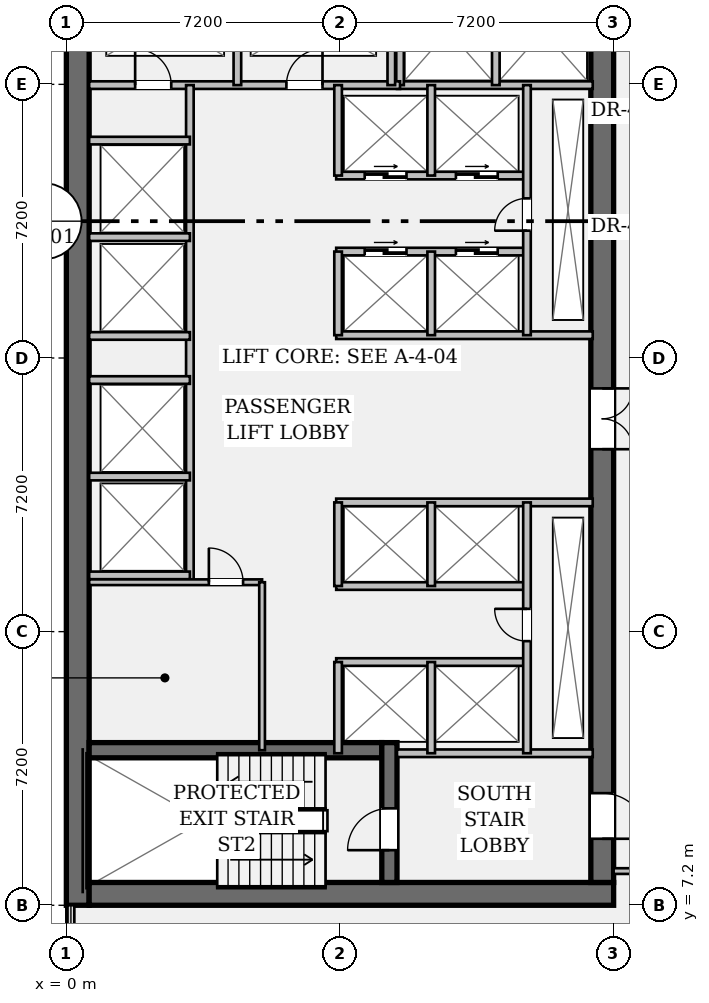
"""IFC4 building model, lengths in metres.
Left out: names, types, materials, properties, quantities, classifications, styles, units other than length and angle.
Written with IfcOpenShell. Run it as: python <this file> out.ifc"""

import sys

from ifc_helpers import new_model, si_unit, direction, frame, frame_2d, origin, place, context, subcontext, project, spatial, rectangle, extrude, element, fill, save


model = new_model("IFC4")
c1 = context("Model", 3, precision=1e-05, world=origin(), true_north=direction((0.0, 1.0)))
c2 = subcontext(c1, "Body", "Model", "MODEL_VIEW")
j1 = project(units=[si_unit("LENGTHUNIT", "METRE"), si_unit("PLANEANGLEUNIT", "RADIAN")], contexts=[c1])
p1 = place(None, origin())
s1 = spatial("IfcSite", under=j1, at=p1, CompositionType="ELEMENT")
p2 = place(p1, origin())
s2 = spatial("IfcBuilding", under=s1, at=p2, CompositionType="ELEMENT")
p3 = place(p2, frame((0.0, 0.0, 54.25)))
s3 = spatial("IfcBuildingStorey", under=s2, at=p3, CompositionType="ELEMENT", Elevation=54.25)
p4 = place(p3, frame((0.3, 7.2, 0.0), z_axis=(0.0, 0.0, 1.0), x_axis=(0.0, 1.0, 0.0)))
e1 = element("IfcWall", 1, at=p4, inside=s3, PredefinedType="SHEAR", context=c2, shape_type="SweptSolid", body=[
    extrude(rectangle(XDim=28.8, YDim=0.6, at=frame_2d((14.4, 0.0))), origin(), (0.0, 0.0, 1.0), 3.57),
])
p5 = place(p3, frame((0.6, 7.5, 0.0), z_axis=(0.0, 0.0, 1.0), x_axis=(1.0, 0.0, 0.0)))
e2 = element("IfcWall", 2, at=p5, inside=s3, PredefinedType="SHEAR", context=c2, shape_type="SweptSolid", body=[
    extrude(rectangle(XDim=13.8, YDim=0.6, at=frame_2d((6.9, 0.0))), origin(), (0.0, 0.0, 1.0), 3.57),
])
p6 = place(p3, frame((14.1, 35.4, 0.0), z_axis=(0.0, 0.0, 1.0), x_axis=(0.0, -1.0, 0.0)))
e3 = element("IfcWall", 3, at=p6, inside=s3, PredefinedType="SHEAR", context=c2, shape_type="SweptSolid", body=[
    extrude(rectangle(XDim=27.6, YDim=0.6, at=frame_2d((13.8, 0.0))), origin(), (0.0, 0.0, 1.0), 3.57),
])
p7 = place(p6, frame((1.3, 0.0, 0.0)))
e4 = element("IfcOpeningElement", 4, at=p7, cuts=e3, PredefinedType="OPENING", context=c2, shape_type="SweptSolid", body=[
    extrude(rectangle(XDim=1.2, YDim=2.15, at=frame_2d((0.6, 1.075))), frame((0.0, 0.312, 0.0), z_axis=(0.0, -1.0, 0.0), x_axis=(1.0, 0.0, 0.0)), (0.0, 0.0, 1.0), 0.624),
])
p8 = place(p6, frame((25.25, 0.0, 0.0)))
e5 = element("IfcOpeningElement", 5, at=p8, cuts=e3, PredefinedType="OPENING", context=c2, shape_type="SweptSolid", body=[
    extrude(rectangle(XDim=1.2, YDim=2.15, at=frame_2d((0.6, 1.075))), frame((0.0, 0.312, 0.0), z_axis=(0.0, -1.0, 0.0), x_axis=(1.0, 0.0, 0.0)), (0.0, 0.0, 1.0), 0.624),
])
p9 = place(p6, frame((14.6, 0.0, 0.0)))
e6 = element("IfcOpeningElement", 6, at=p9, cuts=e3, PredefinedType="OPENING", context=c2, shape_type="SweptSolid", body=[
    extrude(rectangle(XDim=1.6, YDim=2.2, at=frame_2d((0.8, 1.1))), frame((0.0, 0.312, 0.0), z_axis=(0.0, -1.0, 0.0), x_axis=(1.0, 0.0, 0.0)), (0.0, 0.0, 1.0), 0.624),
])
p10 = place(p3, frame((0.6, 11.28, 0.0), z_axis=(0.0, 0.0, 1.0), x_axis=(1.0, 0.0, 0.0)))
e7 = element("IfcWall", 7, at=p10, inside=s3, PredefinedType="SHEAR", context=c2, shape_type="SweptSolid", body=[
    extrude(rectangle(XDim=7.7, YDim=0.4, at=frame_2d((3.85, 0.0))), origin(), (0.0, 0.0, 1.0), 3.57),
])
p11 = place(p3, frame((8.5, 7.8, 0.0), z_axis=(0.0, 0.0, 1.0), x_axis=(0.0, 1.0, 0.0)))
e8 = element("IfcWall", 8, at=p11, inside=s3, PredefinedType="SHEAR", context=c2, shape_type="SweptSolid", body=[
    extrude(rectangle(XDim=3.68, YDim=0.4, at=frame_2d((1.84, 0.0))), origin(), (0.0, 0.0, 1.0), 3.57),
])
p12 = place(p11, frame((0.85, 0.0, 0.0)))
e9 = element("IfcOpeningElement", 9, at=p12, cuts=e8, PredefinedType="OPENING", context=c2, shape_type="SweptSolid", body=[
    extrude(rectangle(XDim=1.1, YDim=2.15, at=frame_2d((0.55, 1.075))), frame((0.0, 0.212, 0.0), z_axis=(0.0, -1.0, 0.0), x_axis=(1.0, 0.0, 0.0)), (0.0, 0.0, 1.0), 0.424),
])
for number, where, z_axis, x_axis in (
    (10, (8.7, 11.2, 0.0), (0.0, 0.0, 1.0), (1.0, 0.0, 0.0)),
    (11, (8.7, 28.78, 0.0), (0.0, 0.0, 1.0), (1.0, 0.0, 0.0)),
):
    element("IfcWall", number, at=place(p3, frame(where, z_axis=z_axis, x_axis=x_axis)), inside=s3, PredefinedType="PARTITIONING", context=c2, shape_type="SweptSolid", body=[
        extrude(rectangle(XDim=5.15, YDim=0.2, at=frame_2d((2.575, 0.0))), origin(), (0.0, 0.0, 1.0), 3.57),
    ])
for number, where, z_axis, x_axis in (
    (12, (8.78, 28.78, 0.0), (0.0, 0.0, 1.0), (0.0, 1.0, 0.0)),
    (13, (11.3, 28.78, 0.0), (0.0, 0.0, 1.0), (0.0, 1.0, 0.0)),
):
    element("IfcWall", number, at=place(p3, frame(where, z_axis=z_axis, x_axis=x_axis)), inside=s3, PredefinedType="PARTITIONING", context=c2, shape_type="SweptSolid", body=[
        extrude(rectangle(XDim=3.1, YDim=0.2, at=frame_2d((1.55, 0.0))), origin(), (0.0, 0.0, 1.0), 3.57),
    ])
p13 = place(p3, frame((0.6, 28.78, 0.0), z_axis=(0.0, 0.0, 1.0), x_axis=(1.0, 0.0, 0.0)))
e14 = element("IfcWall", 14, at=p13, inside=s3, PredefinedType="PARTITIONING", context=c2, shape_type="SweptSolid", body=[
    extrude(rectangle(XDim=8.18, YDim=0.2, at=frame_2d((4.09, 0.0))), origin(), (0.0, 0.0, 1.0), 3.57),
])
p14 = place(p13, frame((1.21, 0.0, 0.0)))
e15 = element("IfcOpeningElement", 15, at=p14, cuts=e14, PredefinedType="OPENING", context=c2, shape_type="SweptSolid", body=[
    extrude(rectangle(XDim=0.95, YDim=2.15, at=frame_2d((0.475, 1.075))), frame((0.0, 0.112, 0.0), z_axis=(0.0, -1.0, 0.0), x_axis=(1.0, 0.0, 0.0)), (0.0, 0.0, 1.0), 0.224),
])
p15 = place(p13, frame((5.19, 0.0, 0.0)))
e16 = element("IfcOpeningElement", 16, at=p15, cuts=e14, PredefinedType="OPENING", context=c2, shape_type="SweptSolid", body=[
    extrude(rectangle(XDim=0.95, YDim=2.15, at=frame_2d((0.475, 1.075))), frame((0.0, 0.112, 0.0), z_axis=(0.0, -1.0, 0.0), x_axis=(1.0, 0.0, 0.0)), (0.0, 0.0, 1.0), 0.224),
])
for number, where, z_axis, x_axis in (
    (17, (4.5, 28.78, 0.0), (0.0, 0.0, 1.0), (0.0, 1.0, 0.0)),
    (18, (8.55, 28.78, 0.0), (0.0, 0.0, 1.0), (0.0, 1.0, 0.0)),
):
    element("IfcWall", number, at=place(p3, frame(where, z_axis=z_axis, x_axis=x_axis)), inside=s3, PredefinedType="PARTITIONING", context=c2, shape_type="SweptSolid", body=[
        extrude(rectangle(XDim=2.94, YDim=0.2, at=frame_2d((1.47, 0.0))), origin(), (0.0, 0.0, 1.0), 3.57),
    ])
p16 = place(p3, frame((3.25, 15.7, 0.0), z_axis=(0.0, 0.0, 1.0), x_axis=(0.0, 1.0, 0.0)))
e19 = element("IfcWall", 19, at=p16, inside=s3, PredefinedType="PARTITIONING", context=c2, shape_type="SweptSolid", body=[
    extrude(rectangle(XDim=13.08, YDim=0.2, at=frame_2d((6.54, 0.0))), origin(), (0.0, 0.0, 1.0), 3.57),
])
for number, where, z_axis, x_axis in (
    (20, (0.6, 15.88, 0.0), (0.0, 0.0, 1.0), (1.0, 0.0, 0.0)),
    (21, (0.6, 18.48, 0.0), (0.0, 0.0, 1.0), (1.0, 0.0, 0.0)),
    (22, (0.6, 22.18, 0.0), (0.0, 0.0, 1.0), (1.0, 0.0, 0.0)),
    (23, (0.6, 24.78, 0.0), (0.0, 0.0, 1.0), (1.0, 0.0, 0.0)),
    (24, (0.6, 21.02, 0.0), (0.0, 0.0, 1.0), (1.0, 0.0, 0.0)),
    (25, (0.6, 27.32, 0.0), (0.0, 0.0, 1.0), (1.0, 0.0, 0.0)),
):
    element("IfcWall", number, at=place(p3, frame(where, z_axis=z_axis, x_axis=x_axis)), inside=s3, PredefinedType="PARTITIONING", context=c2, shape_type="SweptSolid", body=[
        extrude(rectangle(XDim=2.65, YDim=0.2, at=frame_2d((1.325, 0.0))), origin(), (0.0, 0.0, 1.0), 3.57),
    ])
p17 = place(p3, frame((7.1, 22.2, 0.0), z_axis=(0.0, 0.0, 1.0), x_axis=(1.0, 0.0, 0.0)))
e26 = element("IfcWall", 26, at=p17, inside=s3, PredefinedType="PARTITIONING", context=c2, shape_type="SweptSolid", body=[
    extrude(rectangle(XDim=6.75, YDim=0.2, at=frame_2d((3.375, 0.0))), origin(), (0.0, 0.0, 1.0), 3.57),
])
p18 = place(p3, frame((7.1, 24.4, 0.0), z_axis=(0.0, 0.0, 1.0), x_axis=(1.0, 0.0, 0.0)))
e27 = element("IfcWall", 27, at=p18, inside=s3, PredefinedType="PARTITIONING", context=c2, shape_type="SweptSolid", body=[
    extrude(rectangle(XDim=5.02, YDim=0.2, at=frame_2d((2.51, 0.0))), origin(), (0.0, 0.0, 1.0), 3.57),
])
p19 = place(p18, frame((0.75, 0.0, 0.0)))
e28 = element("IfcOpeningElement", 28, at=p19, cuts=e27, PredefinedType="OPENING", context=c2, shape_type="SweptSolid", body=[
    extrude(rectangle(XDim=1.1, YDim=2.2, at=frame_2d((0.55, 1.1))), frame((0.0, 0.112, 0.0), z_axis=(0.0, -1.0, 0.0), x_axis=(1.0, 0.0, 0.0)), (0.0, 0.0, 1.0), 0.224),
])
p20 = place(p18, frame((3.15, 0.0, 0.0)))
e29 = element("IfcOpeningElement", 29, at=p20, cuts=e27, PredefinedType="OPENING", context=c2, shape_type="SweptSolid", body=[
    extrude(rectangle(XDim=1.1, YDim=2.2, at=frame_2d((0.55, 1.1))), frame((0.0, 0.112, 0.0), z_axis=(0.0, -1.0, 0.0), x_axis=(1.0, 0.0, 0.0)), (0.0, 0.0, 1.0), 0.224),
])
p21 = place(p3, frame((7.1, 26.4, 0.0), z_axis=(0.0, 0.0, 1.0), x_axis=(1.0, 0.0, 0.0)))
e30 = element("IfcWall", 30, at=p21, inside=s3, PredefinedType="PARTITIONING", context=c2, shape_type="SweptSolid", body=[
    extrude(rectangle(XDim=5.02, YDim=0.2, at=frame_2d((2.51, 0.0))), origin(), (0.0, 0.0, 1.0), 3.57),
])
p22 = place(p21, frame((0.75, 0.0, 0.0)))
e31 = element("IfcOpeningElement", 31, at=p22, cuts=e30, PredefinedType="OPENING", context=c2, shape_type="SweptSolid", body=[
    extrude(rectangle(XDim=1.1, YDim=2.2, at=frame_2d((0.55, 1.1))), frame((0.0, 0.112, 0.0), z_axis=(0.0, -1.0, 0.0), x_axis=(1.0, 0.0, 0.0)), (0.0, 0.0, 1.0), 0.224),
])
p23 = place(p21, frame((3.15, 0.0, 0.0)))
e32 = element("IfcOpeningElement", 32, at=p23, cuts=e30, PredefinedType="OPENING", context=c2, shape_type="SweptSolid", body=[
    extrude(rectangle(XDim=1.1, YDim=2.2, at=frame_2d((0.55, 1.1))), frame((0.0, 0.112, 0.0), z_axis=(0.0, -1.0, 0.0), x_axis=(1.0, 0.0, 0.0)), (0.0, 0.0, 1.0), 0.224),
])
p24 = place(p3, frame((7.15, 22.2, 0.0), z_axis=(0.0, 0.0, 1.0), x_axis=(0.0, 1.0, 0.0)))
e33 = element("IfcWall", 33, at=p24, inside=s3, PredefinedType="PARTITIONING", context=c2, shape_type="SweptSolid", body=[
    extrude(rectangle(XDim=2.2, YDim=0.2, at=frame_2d((1.1, 0.0))), origin(), (0.0, 0.0, 1.0), 3.57),
])
p25 = place(p3, frame((7.15, 26.4, 0.0), z_axis=(0.0, 0.0, 1.0), x_axis=(0.0, 1.0, 0.0)))
e34 = element("IfcWall", 34, at=p25, inside=s3, PredefinedType="PARTITIONING", context=c2, shape_type="SweptSolid", body=[
    extrude(rectangle(XDim=2.38, YDim=0.2, at=frame_2d((1.19, 0.0))), origin(), (0.0, 0.0, 1.0), 3.57),
])
p26 = place(p3, frame((9.6, 22.2, 0.0), z_axis=(0.0, 0.0, 1.0), x_axis=(0.0, 1.0, 0.0)))
e35 = element("IfcWall", 35, at=p26, inside=s3, PredefinedType="PARTITIONING", context=c2, shape_type="SweptSolid", body=[
    extrude(rectangle(XDim=2.2, YDim=0.2, at=frame_2d((1.1, 0.0))), origin(), (0.0, 0.0, 1.0), 3.57),
])
p27 = place(p3, frame((9.6, 26.4, 0.0), z_axis=(0.0, 0.0, 1.0), x_axis=(0.0, 1.0, 0.0)))
e36 = element("IfcWall", 36, at=p27, inside=s3, PredefinedType="PARTITIONING", context=c2, shape_type="SweptSolid", body=[
    extrude(rectangle(XDim=2.38, YDim=0.2, at=frame_2d((1.19, 0.0))), origin(), (0.0, 0.0, 1.0), 3.57),
])
p28 = place(p3, frame((12.12, 22.2, 0.0), z_axis=(0.0, 0.0, 1.0), x_axis=(0.0, 1.0, 0.0)))
e37 = element("IfcWall", 37, at=p28, inside=s3, PredefinedType="PARTITIONING", context=c2, shape_type="SweptSolid", body=[
    extrude(rectangle(XDim=6.58, YDim=0.2, at=frame_2d((3.29, 0.0))), origin(), (0.0, 0.0, 1.0), 3.57),
])
p29 = place(p28, frame((2.75, 0.0, 0.0)))
e38 = element("IfcOpeningElement", 38, at=p29, cuts=e37, PredefinedType="OPENING", context=c2, shape_type="SweptSolid", body=[
    extrude(rectangle(XDim=0.85, YDim=2.15, at=frame_2d((0.425, 1.075))), frame((0.0, 0.112, 0.0), z_axis=(0.0, -1.0, 0.0), x_axis=(1.0, 0.0, 0.0)), (0.0, 0.0, 1.0), 0.224),
])
p30 = place(p3, frame((7.1, 17.8, 0.0), z_axis=(0.0, 0.0, 1.0), x_axis=(1.0, 0.0, 0.0)))
e39 = element("IfcWall", 39, at=p30, inside=s3, PredefinedType="PARTITIONING", context=c2, shape_type="SweptSolid", body=[
    extrude(rectangle(XDim=6.75, YDim=0.2, at=frame_2d((3.375, 0.0))), origin(), (0.0, 0.0, 1.0), 3.57),
])
for number, where, z_axis, x_axis in (
    (40, (7.1, 15.6, 0.0), (0.0, 0.0, 1.0), (1.0, 0.0, 0.0)),
    (41, (7.1, 13.6, 0.0), (0.0, 0.0, 1.0), (1.0, 0.0, 0.0)),
):
    element("IfcWall", number, at=place(p3, frame(where, z_axis=z_axis, x_axis=x_axis)), inside=s3, PredefinedType="PARTITIONING", context=c2, shape_type="SweptSolid", body=[
        extrude(rectangle(XDim=5.02, YDim=0.2, at=frame_2d((2.51, 0.0))), origin(), (0.0, 0.0, 1.0), 3.57),
    ])
p31 = place(p3, frame((7.15, 15.6, 0.0), z_axis=(0.0, 0.0, 1.0), x_axis=(0.0, 1.0, 0.0)))
e42 = element("IfcWall", 42, at=p31, inside=s3, PredefinedType="PARTITIONING", context=c2, shape_type="SweptSolid", body=[
    extrude(rectangle(XDim=2.2, YDim=0.2, at=frame_2d((1.1, 0.0))), origin(), (0.0, 0.0, 1.0), 3.57),
])
p32 = place(p3, frame((7.15, 11.2, 0.0), z_axis=(0.0, 0.0, 1.0), x_axis=(0.0, 1.0, 0.0)))
e43 = element("IfcWall", 43, at=p32, inside=s3, PredefinedType="PARTITIONING", context=c2, shape_type="SweptSolid", body=[
    extrude(rectangle(XDim=2.4, YDim=0.2, at=frame_2d((1.2, 0.0))), origin(), (0.0, 0.0, 1.0), 3.57),
])
p33 = place(p3, frame((9.6, 15.6, 0.0), z_axis=(0.0, 0.0, 1.0), x_axis=(0.0, 1.0, 0.0)))
e44 = element("IfcWall", 44, at=p33, inside=s3, PredefinedType="PARTITIONING", context=c2, shape_type="SweptSolid", body=[
    extrude(rectangle(XDim=2.2, YDim=0.2, at=frame_2d((1.1, 0.0))), origin(), (0.0, 0.0, 1.0), 3.57),
])
p34 = place(p3, frame((9.6, 11.2, 0.0), z_axis=(0.0, 0.0, 1.0), x_axis=(0.0, 1.0, 0.0)))
e45 = element("IfcWall", 45, at=p34, inside=s3, PredefinedType="PARTITIONING", context=c2, shape_type="SweptSolid", body=[
    extrude(rectangle(XDim=2.4, YDim=0.2, at=frame_2d((1.2, 0.0))), origin(), (0.0, 0.0, 1.0), 3.57),
])
p35 = place(p3, frame((12.12, 11.2, 0.0), z_axis=(0.0, 0.0, 1.0), x_axis=(0.0, 1.0, 0.0)))
e46 = element("IfcWall", 46, at=p35, inside=s3, PredefinedType="PARTITIONING", context=c2, shape_type="SweptSolid", body=[
    extrude(rectangle(XDim=6.6, YDim=0.2, at=frame_2d((3.3, 0.0))), origin(), (0.0, 0.0, 1.0), 3.57),
])
p36 = place(p35, frame((2.95, 0.0, 0.0)))
e47 = element("IfcOpeningElement", 47, at=p36, cuts=e46, PredefinedType="OPENING", context=c2, shape_type="SweptSolid", body=[
    extrude(rectangle(XDim=0.85, YDim=2.15, at=frame_2d((0.425, 1.075))), frame((0.0, 0.112, 0.0), z_axis=(0.0, -1.0, 0.0), x_axis=(1.0, 0.0, 0.0)), (0.0, 0.0, 1.0), 0.224),
])
p37 = place(p3, frame((0.6, 15.7, 0.0), z_axis=(0.0, 0.0, 1.0), x_axis=(1.0, 0.0, 0.0)))
e48 = element("IfcWall", 48, at=p37, inside=s3, PredefinedType="PARTITIONING", context=c2, shape_type="SweptSolid", body=[
    extrude(rectangle(XDim=4.55, YDim=0.15, at=frame_2d((2.275, 0.0))), origin(), (0.0, 0.0, 1.0), 3.57),
])
p38 = place(p37, frame((3.15, 0.0, 0.0)))
e49 = element("IfcOpeningElement", 49, at=p38, cuts=e48, PredefinedType="OPENING", context=c2, shape_type="SweptSolid", body=[
    extrude(rectangle(XDim=0.9, YDim=2.15, at=frame_2d((0.45, 1.075))), frame((0.0, 0.087, 0.0), z_axis=(0.0, -1.0, 0.0), x_axis=(1.0, 0.0, 0.0)), (0.0, 0.0, 1.0), 0.174),
])
p39 = place(p3, frame((5.15, 11.28, 0.0), z_axis=(0.0, 0.0, 1.0), x_axis=(0.0, 1.0, 0.0)))
e50 = element("IfcWall", 50, at=p39, inside=s3, PredefinedType="PARTITIONING", context=c2, shape_type="SweptSolid", body=[
    extrude(rectangle(XDim=4.42, YDim=0.15, at=frame_2d((2.21, 0.0))), origin(), (0.0, 0.0, 1.0), 3.57),
])
p40 = place(p3, frame((14.4, 8.1, 0.0), z_axis=(0.0, 0.0, 1.0), x_axis=(1.0, 0.0, 0.0)))
e51 = element("IfcWall", 51, at=p40, inside=s3, PredefinedType="PARTITIONING", context=c2, shape_type="SweptSolid", body=[
    extrude(rectangle(XDim=2.95, YDim=0.15, at=frame_2d((1.475, 0.0))), origin(), (0.0, 0.0, 1.0), 3.088),
])
p41 = place(p40, frame((0.95, 0.0, 0.0)))
e52 = element("IfcOpeningElement", 52, at=p41, cuts=e51, PredefinedType="OPENING", context=c2, shape_type="SweptSolid", body=[
    extrude(rectangle(XDim=0.95, YDim=2.15, at=frame_2d((0.475, 1.075))), frame((0.0, 0.087, 0.0), z_axis=(0.0, -1.0, 0.0), x_axis=(1.0, 0.0, 0.0)), (0.0, 0.0, 1.0), 0.174),
])
p42 = place(p12, origin())
e53 = element("IfcDoor", 53, at=p42, inside=s3, OperationType="SINGLE_SWING_LEFT", PredefinedType="DOOR", context=c2, shape_type="SweptSolid", body=[
    extrude(rectangle(XDim=1.1, YDim=2.15, at=frame_2d((0.55, 1.075))), frame((0.0, 0.025, 0.0), z_axis=(0.0, -1.0, 0.0), x_axis=(1.0, 0.0, 0.0)), (0.0, 0.0, 1.0), 0.05),
])
fill(e9, e53)
p43 = place(p8, origin())
e54 = element("IfcDoor", 54, at=p43, inside=s3, OperationType="SINGLE_SWING_RIGHT", PredefinedType="DOOR", context=c2, shape_type="SweptSolid", body=[
    extrude(rectangle(XDim=1.2, YDim=2.15, at=frame_2d((0.6, 1.075))), frame((0.0, 0.025, 0.0), z_axis=(0.0, -1.0, 0.0), x_axis=(1.0, 0.0, 0.0)), (0.0, 0.0, 1.0), 0.05),
])
fill(e5, e54)
p44 = place(p14, origin())
e55 = element("IfcDoor", 55, at=p44, inside=s3, OperationType="SINGLE_SWING_LEFT", PredefinedType="DOOR", context=c2, shape_type="SweptSolid", body=[
    extrude(rectangle(XDim=0.95, YDim=2.15, at=frame_2d((0.475, 1.075))), frame((0.0, 0.025, 0.0), z_axis=(0.0, -1.0, 0.0), x_axis=(1.0, 0.0, 0.0)), (0.0, 0.0, 1.0), 0.05),
])
fill(e15, e55)
p45 = place(p15, origin())
e56 = element("IfcDoor", 56, at=p45, inside=s3, OperationType="SINGLE_SWING_RIGHT", PredefinedType="DOOR", context=c2, shape_type="SweptSolid", body=[
    extrude(rectangle(XDim=0.95, YDim=2.15, at=frame_2d((0.475, 1.075))), frame((0.0, 0.025, 0.0), z_axis=(0.0, -1.0, 0.0), x_axis=(1.0, 0.0, 0.0)), (0.0, 0.0, 1.0), 0.05),
])
fill(e16, e56)
p46 = place(p9, origin())
e57 = element("IfcDoor", 57, at=p46, inside=s3, OperationType="DOUBLE_DOOR_SINGLE_SWING", PredefinedType="DOOR", context=c2, shape_type="SweptSolid", body=[
    extrude(rectangle(XDim=1.6, YDim=2.2, at=frame_2d((0.8, 1.1))), frame((0.0, 0.025, 0.0), z_axis=(0.0, -1.0, 0.0), x_axis=(1.0, 0.0, 0.0)), (0.0, 0.0, 1.0), 0.05),
])
fill(e6, e57)
p47 = place(p29, origin())
e58 = element("IfcDoor", 58, at=p47, inside=s3, OperationType="SINGLE_SWING_LEFT", PredefinedType="DOOR", context=c2, shape_type="SweptSolid", body=[
    extrude(rectangle(XDim=0.85, YDim=2.15, at=frame_2d((0.425, 1.075))), frame((0.0, 0.025, 0.0), z_axis=(0.0, -1.0, 0.0), x_axis=(1.0, 0.0, 0.0)), (0.0, 0.0, 1.0), 0.05),
])
fill(e38, e58)
p48 = place(p19, origin())
e59 = element("IfcDoor", 59, at=p48, inside=s3, OperationType="DOUBLE_DOOR_SLIDING", PredefinedType="DOOR", context=c2, shape_type="SweptSolid", body=[
    extrude(rectangle(XDim=1.1, YDim=2.2, at=frame_2d((0.55, 1.1))), frame((0.0, 0.025, 0.0), z_axis=(0.0, -1.0, 0.0), x_axis=(1.0, 0.0, 0.0)), (0.0, 0.0, 1.0), 0.05),
])
fill(e28, e59)
p49 = place(p20, origin())
e60 = element("IfcDoor", 60, at=p49, inside=s3, OperationType="DOUBLE_DOOR_SLIDING", PredefinedType="DOOR", context=c2, shape_type="SweptSolid", body=[
    extrude(rectangle(XDim=1.1, YDim=2.2, at=frame_2d((0.55, 1.1))), frame((0.0, 0.025, 0.0), z_axis=(0.0, -1.0, 0.0), x_axis=(1.0, 0.0, 0.0)), (0.0, 0.0, 1.0), 0.05),
])
fill(e29, e60)
p50 = place(p22, origin())
e61 = element("IfcDoor", 61, at=p50, inside=s3, OperationType="DOUBLE_DOOR_SLIDING", PredefinedType="DOOR", context=c2, shape_type="SweptSolid", body=[
    extrude(rectangle(XDim=1.1, YDim=2.2, at=frame_2d((0.55, 1.1))), frame((0.0, 0.025, 0.0), z_axis=(0.0, -1.0, 0.0), x_axis=(1.0, 0.0, 0.0)), (0.0, 0.0, 1.0), 0.05),
])
fill(e31, e61)
p51 = place(p23, origin())
e62 = element("IfcDoor", 62, at=p51, inside=s3, OperationType="DOUBLE_DOOR_SLIDING", PredefinedType="DOOR", context=c2, shape_type="SweptSolid", body=[
    extrude(rectangle(XDim=1.1, YDim=2.2, at=frame_2d((0.55, 1.1))), frame((0.0, 0.025, 0.0), z_axis=(0.0, -1.0, 0.0), x_axis=(1.0, 0.0, 0.0)), (0.0, 0.0, 1.0), 0.05),
])
fill(e32, e62)
p52 = place(p36, origin())
e63 = element("IfcDoor", 63, at=p52, inside=s3, OperationType="SINGLE_SWING_RIGHT", PredefinedType="DOOR", context=c2, shape_type="SweptSolid", body=[
    extrude(rectangle(XDim=0.85, YDim=2.15, at=frame_2d((0.425, 1.075))), frame((0.0, 0.025, 0.0), z_axis=(0.0, -1.0, 0.0), x_axis=(1.0, 0.0, 0.0)), (0.0, 0.0, 1.0), 0.05),
])
fill(e47, e63)
p53 = place(p38, origin())
e64 = element("IfcDoor", 64, at=p53, inside=s3, OperationType="SINGLE_SWING_LEFT", PredefinedType="DOOR", context=c2, shape_type="SweptSolid", body=[
    extrude(rectangle(XDim=0.9, YDim=2.15, at=frame_2d((0.45, 1.075))), frame((0.0, 0.025, 0.0), z_axis=(0.0, -1.0, 0.0), x_axis=(1.0, 0.0, 0.0)), (0.0, 0.0, 1.0), 0.05),
])
fill(e49, e64)
save(model, sys.argv[1])
